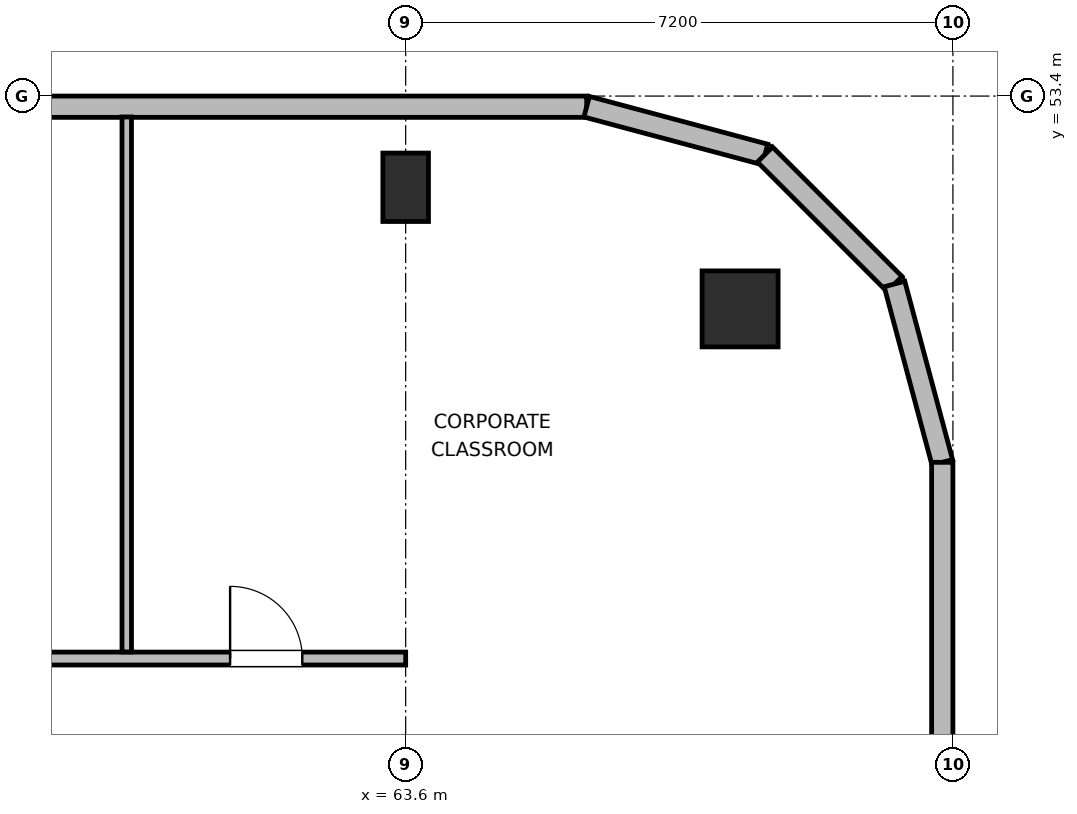
"""IFC4 building model, lengths in metres.
Left out: names, types, materials, properties, quantities, classifications, styles, units other than length and angle.
Written with IfcOpenShell. Run it as: python <this file> out.ifc"""

import sys

from ifc_helpers import new_model, si_unit, direction, frame, frame_2d, origin, origin_2d, place, context, subcontext, project, spatial, rectangle, circle, extrude, element, fill, save


model = new_model("IFC4")
c1 = context("Model", 3, precision=1e-05, world=origin(), true_north=direction((0.0, 1.0)))
c2 = subcontext(c1, "Body", "Model", "MODEL_VIEW")
j1 = project(units=[si_unit("LENGTHUNIT", "METRE"), si_unit("PLANEANGLEUNIT", "RADIAN")], contexts=[c1])
p1 = place(None, origin())
s1 = spatial("IfcSite", under=j1, at=p1, CompositionType="ELEMENT")
p2 = place(p1, origin())
s2 = spatial("IfcBuilding", under=s1, at=p2, CompositionType="ELEMENT")
p3 = place(p2, frame((0.0, 0.0, 350.4)))
s3 = spatial("IfcBuildingStorey", under=s2, at=p3, CompositionType="ELEMENT", Elevation=350.4)
p4 = place(p3, frame((68.0, 50.6, 0.0), z_axis=(0.0, 0.0, 1.0), x_axis=(1.0, 0.0, 0.0)))
e1 = element("IfcColumn", 1, at=p4, inside=s3, PredefinedType="COLUMN", context=c2, shape_type="SweptSolid", body=[
    extrude(circle(Radius=0.5, at=origin_2d()), origin(), (0.0, 0.0, 1.0), 4.5),
])
p5 = place(p3, frame((63.6, 52.2, 0.0), z_axis=(0.0, 0.0, 1.0), x_axis=(1.0, 0.0, 0.0)))
e2 = element("IfcColumn", 2, at=p5, inside=s3, PredefinedType="COLUMN", context=c2, shape_type="SweptSolid", body=[
    extrude(rectangle(XDim=0.6, YDim=0.9, at=origin_2d()), origin(), (0.0, 0.0, 1.0), 4.5),
])
p6 = place(p3, frame((54.631, 53.26, 0.0), z_axis=(0.0, 0.0, 1.0), x_axis=(1.0, 0.0, 0.0)))
e3 = element("IfcWall", 3, at=p6, inside=s3, PredefinedType="SOLIDWALL", context=c2, shape_type="SweptSolid", body=[
    extrude(rectangle(XDim=11.351, YDim=0.28, at=frame_2d((5.675, 0.0))), origin(), (0.0, 0.0, 1.0), 4.2),
])
p7 = place(p3, frame((65.982, 53.26, 0.0), z_axis=(0.0, 0.0, 1.0), x_axis=(0.965937282298, -0.25877628691, 0.0)))
e4 = element("IfcWall", 4, at=p7, inside=s3, PredefinedType="SOLIDWALL", context=c2, shape_type="SweptSolid", body=[
    extrude(rectangle(XDim=2.428, YDim=0.28, at=frame_2d((1.214, 0.0))), origin(), (0.0, 0.0, 1.0), 4.2),
])
p8 = place(p3, frame((68.327, 52.632, 0.0), z_axis=(0.0, 0.0, 1.0), x_axis=(0.707106781187, -0.707106781187, 0.0)))
e5 = element("IfcWall", 5, at=p8, inside=s3, PredefinedType="SOLIDWALL", context=c2, shape_type="SweptSolid", body=[
    extrude(rectangle(XDim=2.41, YDim=0.28, at=frame_2d((1.205, 0.0))), origin(), (0.0, 0.0, 1.0), 2.695),
])
p9 = place(p3, frame((70.031, 50.927, 0.0), z_axis=(0.0, 0.0, 1.0), x_axis=(0.258751159445, -0.965944013639, 0.0)))
e6 = element("IfcWall", 6, at=p9, inside=s3, PredefinedType="SOLIDWALL", context=c2, shape_type="SweptSolid", body=[
    extrude(rectangle(XDim=2.429, YDim=0.28, at=frame_2d((1.214, 0.0))), origin(), (0.0, 0.0, 1.0), 2.695),
])
p10 = place(p3, frame((70.66, 48.582, 0.0), z_axis=(0.0, 0.0, 1.0), x_axis=(0.0, -1.0, 0.0)))
e7 = element("IfcWall", 7, at=p10, inside=s3, PredefinedType="SOLIDWALL", context=c2, shape_type="SweptSolid", body=[
    extrude(rectangle(XDim=5.842, YDim=0.28, at=frame_2d((2.921, 0.0))), origin(), (0.0, 0.0, 1.0), 4.2),
])
p11 = place(p3, frame((30.725, 46.0, 0.0), z_axis=(0.0, 0.0, 1.0), x_axis=(1.0, 0.0, 0.0)))
e8 = element("IfcWall", 8, at=p11, inside=s3, PredefinedType="PARTITIONING", context=c2, shape_type="SweptSolid", body=[
    extrude(rectangle(XDim=32.875, YDim=0.17, at=frame_2d((16.438, 0.0))), origin(), (0.0, 0.0, 1.0), 4.2),
])
p12 = place(p11, frame((3.487, 0.0, 0.0)))
e9 = element("IfcOpeningElement", 9, at=p12, cuts=e8, PredefinedType="OPENING", context=c2, shape_type="SweptSolid", body=[
    extrude(rectangle(XDim=0.95, YDim=2.04, at=frame_2d((0.475, 1.02))), frame((0.0, 0.095, 0.0), z_axis=(0.0, -1.0, 0.0), x_axis=(1.0, 0.0, 0.0)), (0.0, 0.0, 1.0), 0.19),
])
p13 = place(p11, frame((8.685, 0.0, 0.0)))
e10 = element("IfcOpeningElement", 10, at=p13, cuts=e8, PredefinedType="OPENING", context=c2, shape_type="SweptSolid", body=[
    extrude(rectangle(XDim=0.95, YDim=2.04, at=frame_2d((0.475, 1.02))), frame((0.0, 0.095, 0.0), z_axis=(0.0, -1.0, 0.0), x_axis=(1.0, 0.0, 0.0)), (0.0, 0.0, 1.0), 0.19),
])
p14 = place(p11, frame((13.835, 0.0, 0.0)))
e11 = element("IfcOpeningElement", 11, at=p14, cuts=e8, PredefinedType="OPENING", context=c2, shape_type="SweptSolid", body=[
    extrude(rectangle(XDim=0.95, YDim=2.04, at=frame_2d((0.475, 1.02))), frame((0.0, 0.095, 0.0), z_axis=(0.0, -1.0, 0.0), x_axis=(1.0, 0.0, 0.0)), (0.0, 0.0, 1.0), 0.19),
])
p15 = place(p11, frame((20.22, 0.0, 0.0)))
e12 = element("IfcOpeningElement", 12, at=p15, cuts=e8, PredefinedType="OPENING", context=c2, shape_type="SweptSolid", body=[
    extrude(rectangle(XDim=0.95, YDim=2.04, at=frame_2d((0.475, 1.02))), frame((0.0, 0.095, 0.0), z_axis=(0.0, -1.0, 0.0), x_axis=(1.0, 0.0, 0.0)), (0.0, 0.0, 1.0), 0.19),
])
p16 = place(p11, frame((25.71, 0.0, 0.0)))
e13 = element("IfcOpeningElement", 13, at=p16, cuts=e8, PredefinedType="OPENING", context=c2, shape_type="SweptSolid", body=[
    extrude(rectangle(XDim=0.95, YDim=2.04, at=frame_2d((0.475, 1.02))), frame((0.0, 0.095, 0.0), z_axis=(0.0, -1.0, 0.0), x_axis=(1.0, 0.0, 0.0)), (0.0, 0.0, 1.0), 0.19),
])
p17 = place(p11, frame((30.565, 0.0, 0.0)))
e14 = element("IfcOpeningElement", 14, at=p17, cuts=e8, PredefinedType="OPENING", context=c2, shape_type="SweptSolid", body=[
    extrude(rectangle(XDim=0.95, YDim=2.04, at=frame_2d((0.475, 1.02))), frame((0.0, 0.095, 0.0), z_axis=(0.0, -1.0, 0.0), x_axis=(1.0, 0.0, 0.0)), (0.0, 0.0, 1.0), 0.19),
])
p18 = place(p3, frame((59.93, 46.087, 0.0), z_axis=(0.0, 0.0, 1.0), x_axis=(0.0, 1.0, 0.0)))
e15 = element("IfcWall", 15, at=p18, inside=s3, PredefinedType="PARTITIONING", context=c2, shape_type="SweptSolid", body=[
    extrude(rectangle(XDim=7.038, YDim=0.125, at=frame_2d((3.519, 0.0))), origin(), (0.0, 0.0, 1.0), 4.2),
])
p19 = place(p17, origin())
e16 = element("IfcDoor", 16, at=p19, inside=s3, OperationType="SINGLE_SWING_LEFT", PredefinedType="DOOR", context=c2, shape_type="SweptSolid", body=[
    extrude(rectangle(XDim=0.95, YDim=2.04, at=frame_2d((0.475, 1.02))), frame((0.0, 0.025, 0.0), z_axis=(0.0, -1.0, 0.0), x_axis=(1.0, 0.0, 0.0)), (0.0, 0.0, 1.0), 0.05),
])
fill(e14, e16)
save(model, sys.argv[1])
